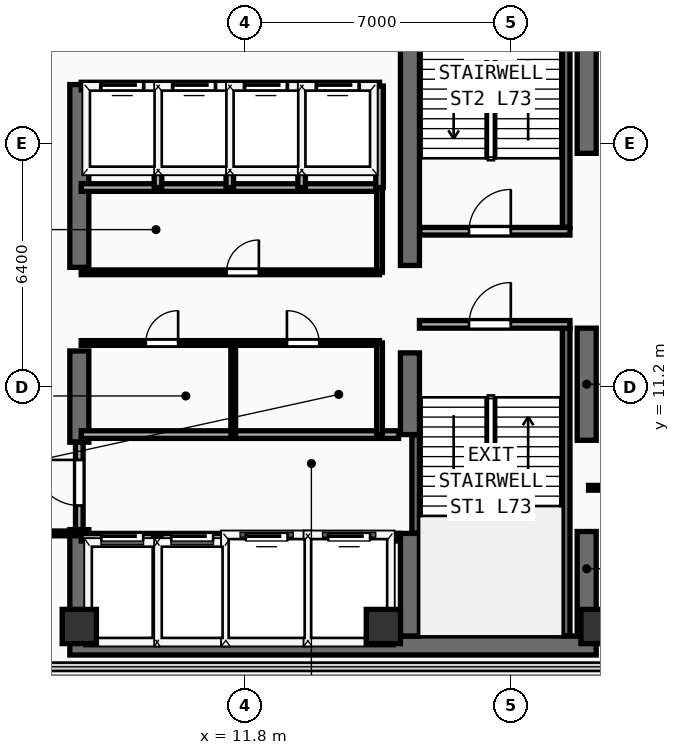
"""IFC4 building model, lengths in metres.
Left out: names, types, materials, properties, quantities, classifications, styles, units other than length and angle.
Written with IfcOpenShell. Run it as: python <this file> out.ifc"""

import sys

from ifc_helpers import new_model, si_unit, direction, frame, frame_2d, origin, origin_2d, place, context, subcontext, project, spatial, rectangle, extrude, element, fill, save


model = new_model("IFC4")
c1 = context("Model", 3, precision=1e-05, world=origin(), true_north=direction((0.0, 1.0)))
c2 = subcontext(c1, "Body", "Model", "MODEL_VIEW")
j1 = project(units=[si_unit("LENGTHUNIT", "METRE"), si_unit("PLANEANGLEUNIT", "RADIAN")], contexts=[c1])
p1 = place(None, origin())
s1 = spatial("IfcSite", under=j1, at=p1, CompositionType="ELEMENT")
p2 = place(p1, origin())
s2 = spatial("IfcBuilding", under=s1, at=p2, CompositionType="ELEMENT")
p3 = place(p2, frame((0.0, 0.0, 285.6)))
s3 = spatial("IfcBuildingStorey", under=s2, at=p3, CompositionType="ELEMENT", Elevation=285.6)
p4 = place(p3, frame((7.2, 4.4, 0.0), z_axis=(0.0, 0.0, 1.0), x_axis=(1.0, 0.0, 0.0)))
e1 = element("IfcWall", 1, at=p4, inside=s3, PredefinedType="SHEAR", context=c2, shape_type="SweptSolid", body=[
    extrude(rectangle(XDim=13.85, YDim=0.5, at=frame_2d((6.925, 0.0))), origin(), (0.0, 0.0, 1.0), 3.56),
])
p5 = place(p3, frame((7.45, 4.65, 0.0), z_axis=(0.0, 0.0, 1.0), x_axis=(0.0, 1.0, 0.0)))
e2 = element("IfcWall", 2, at=p5, inside=s3, PredefinedType="SHEAR", context=c2, shape_type="SweptSolid", body=[
    extrude(rectangle(XDim=2.8, YDim=0.5, at=frame_2d((1.4, 0.0))), origin(), (0.0, 0.0, 1.0), 3.56),
])
p6 = place(p3, frame((7.45, 9.75, 0.0), z_axis=(0.0, 0.0, 1.0), x_axis=(0.0, 1.0, 0.0)))
e3 = element("IfcWall", 3, at=p6, inside=s3, PredefinedType="SHEAR", context=c2, shape_type="SweptSolid", body=[
    extrude(rectangle(XDim=2.4, YDim=0.5, at=frame_2d((1.2, 0.0))), origin(), (0.0, 0.0, 1.0), 3.56),
])
p7 = place(p3, frame((7.45, 14.35, 0.0), z_axis=(0.0, 0.0, 1.0), x_axis=(0.0, 1.0, 0.0)))
e4 = element("IfcWall", 4, at=p7, inside=s3, PredefinedType="SHEAR", context=c2, shape_type="SweptSolid", body=[
    extrude(rectangle(XDim=4.81, YDim=0.5, at=frame_2d((2.405, 0.0))), origin(), (0.0, 0.0, 1.0), 3.56),
])
p8 = place(p3, frame((20.8, 4.65, 0.0), z_axis=(0.0, 0.0, 1.0), x_axis=(0.0, 1.0, 0.0)))
e5 = element("IfcWall", 5, at=p8, inside=s3, PredefinedType="SHEAR", context=c2, shape_type="SweptSolid", body=[
    extrude(rectangle(XDim=2.75, YDim=0.5, at=frame_2d((1.375, 0.0))), origin(), (0.0, 0.0, 1.0), 3.56),
])
p9 = place(p3, frame((20.8, 9.8, 0.0), z_axis=(0.0, 0.0, 1.0), x_axis=(0.0, 1.0, 0.0)))
e6 = element("IfcWall", 6, at=p9, inside=s3, PredefinedType="SHEAR", context=c2, shape_type="SweptSolid", body=[
    extrude(rectangle(XDim=2.95, YDim=0.5, at=frame_2d((1.475, 0.0))), origin(), (0.0, 0.0, 1.0), 3.56),
])
p10 = place(p3, frame((20.8, 17.35, 0.0), z_axis=(0.0, 0.0, 1.0), x_axis=(0.0, 1.0, 0.0)))
e7 = element("IfcWall", 7, at=p10, inside=s3, PredefinedType="SHEAR", context=c2, shape_type="SweptSolid", body=[
    extrude(rectangle(XDim=6.15, YDim=0.5, at=frame_2d((3.075, 0.0))), origin(), (0.0, 0.0, 1.0), 3.56),
])
p11 = place(p3, frame((16.15, 4.65, 0.0), z_axis=(0.0, 0.0, 1.0), x_axis=(0.0, 1.0, 0.0)))
e8 = element("IfcWall", 8, at=p11, inside=s3, PredefinedType="SHEAR", context=c2, shape_type="SweptSolid", body=[
    extrude(rectangle(XDim=2.7, YDim=0.5, at=frame_2d((1.35, 0.0))), origin(), (0.0, 0.0, 1.0), 3.56),
])
p12 = place(p3, frame((16.15, 9.95, 0.0), z_axis=(0.0, 0.0, 1.0), x_axis=(0.0, 1.0, 0.0)))
e9 = element("IfcWall", 9, at=p12, inside=s3, PredefinedType="SHEAR", context=c2, shape_type="SweptSolid", body=[
    extrude(rectangle(XDim=2.15, YDim=0.5, at=frame_2d((1.075, 0.0))), origin(), (0.0, 0.0, 1.0), 3.56),
])
p13 = place(p3, frame((16.15, 14.4, 0.0), z_axis=(0.0, 0.0, 1.0), x_axis=(0.0, 1.0, 0.0)))
e10 = element("IfcWall", 10, at=p13, inside=s3, PredefinedType="SHEAR", context=c2, shape_type="SweptSolid", body=[
    extrude(rectangle(XDim=9.1, YDim=0.5, at=frame_2d((4.55, 0.0))), origin(), (0.0, 0.0, 1.0), 3.56),
])
for number, where, z_axis, x_axis in (
    (11, (7.45, 4.9, 0.0), (0.0, 0.0, 1.0), (1.0, 0.0, 0.0)),
    (12, (15.45, 4.9, 0.0), (0.0, 0.0, 1.0), (1.0, 0.0, 0.0)),
    (13, (21.1, 4.9, 0.0), (0.0, 0.0, 1.0), (1.0, 0.0, 0.0)),
):
    element("IfcColumn", number, at=place(p3, frame(where, z_axis=z_axis, x_axis=x_axis)), inside=s3, PredefinedType="COLUMN", context=c2, shape_type="SweptSolid", body=[
        extrude(rectangle(XDim=0.9, YDim=0.9, at=origin_2d()), origin(), (0.0, 0.0, 1.0), 3.56),
    ])
p14 = place(p3, frame((27.622, 19.712, 0.0), z_axis=(0.0, 0.0, 1.0), x_axis=(-0.707120040392, 0.707093521733, 0.0)))
e14 = element("IfcWall", 14, at=p14, inside=s3, PredefinedType="SOLIDWALL", context=c2, shape_type="SweptSolid", body=[
    extrude(rectangle(XDim=9.206, YDim=0.28, at=frame_2d((4.603, 0.0))), origin(), (0.0, 0.0, 1.0), 3.56),
])
p15 = place(p3, frame((16.3, 7.36, 0.0), z_axis=(0.0, 0.0, 1.0), x_axis=(0.0, 1.0, 0.0)))
e15 = element("IfcWall", 15, at=p15, inside=s3, PredefinedType="SHEAR", context=c2, shape_type="SweptSolid", body=[
    extrude(rectangle(XDim=2.58, YDim=0.2, at=frame_2d((1.29, 0.0))), origin(), (0.0, 0.0, 1.0), 3.56),
])
p16 = place(p3, frame((20.26, 4.66, 0.0), z_axis=(0.0, 0.0, 1.0), x_axis=(0.0, 1.0, 0.0)))
e16 = element("IfcWall", 16, at=p16, inside=s3, PredefinedType="SHEAR", context=c2, shape_type="SweptSolid", body=[
    extrude(rectangle(XDim=8.09, YDim=0.2, at=frame_2d((4.045, 0.0))), origin(), (0.0, 0.0, 1.0), 3.56),
])
p17 = place(p3, frame((16.4, 12.85, 0.0), z_axis=(0.0, 0.0, 1.0), x_axis=(1.0, 0.0, 0.0)))
e17 = element("IfcWall", 17, at=p17, inside=s3, PredefinedType="PARTITIONING", context=c2, shape_type="SweptSolid", body=[
    extrude(rectangle(XDim=3.96, YDim=0.2, at=frame_2d((1.98, 0.0))), origin(), (0.0, 0.0, 1.0), 3.56),
])
p18 = place(p17, frame((1.304, 0.0, 0.0)))
e18 = element("IfcOpeningElement", 18, at=p18, cuts=e17, PredefinedType="OPENING", context=c2, shape_type="SweptSolid", body=[
    extrude(rectangle(XDim=1.1, YDim=2.2, at=frame_2d((0.55, 1.1))), frame((0.0, 0.11, 0.0), z_axis=(0.0, -1.0, 0.0), x_axis=(1.0, 0.0, 0.0)), (0.0, 0.0, 1.0), 0.22),
])
p19 = place(p3, frame((20.26, 15.4, 0.0), z_axis=(0.0, 0.0, 1.0), x_axis=(0.0, 1.0, 0.0)))
e19 = element("IfcWall", 19, at=p19, inside=s3, PredefinedType="SHEAR", context=c2, shape_type="SweptSolid", body=[
    extrude(rectangle(XDim=8.09, YDim=0.2, at=frame_2d((4.045, 0.0))), origin(), (0.0, 0.0, 1.0), 3.56),
])
p20 = place(p3, frame((16.41, 15.3, 0.0), z_axis=(0.0, 0.0, 1.0), x_axis=(1.0, 0.0, 0.0)))
e20 = element("IfcWall", 20, at=p20, inside=s3, PredefinedType="PARTITIONING", context=c2, shape_type="SweptSolid", body=[
    extrude(rectangle(XDim=3.95, YDim=0.2, at=frame_2d((1.975, 0.0))), origin(), (0.0, 0.0, 1.0), 3.56),
])
p21 = place(p20, frame((1.294, 0.0, 0.0)))
e21 = element("IfcOpeningElement", 21, at=p21, cuts=e20, PredefinedType="OPENING", context=c2, shape_type="SweptSolid", body=[
    extrude(rectangle(XDim=1.1, YDim=2.2, at=frame_2d((0.55, 1.1))), frame((0.0, 0.11, 0.0), z_axis=(0.0, -1.0, 0.0), x_axis=(1.0, 0.0, 0.0)), (0.0, 0.0, 1.0), 0.22),
])
p22 = place(p3, frame((7.5, 7.25, 0.0), z_axis=(0.0, 0.0, 1.0), x_axis=(1.0, 0.0, 0.0)))
e22 = element("IfcWall", 22, at=p22, inside=s3, PredefinedType="PARTITIONING", context=c2, shape_type="SweptSolid", body=[
    extrude(rectangle(XDim=8.35, YDim=0.2, at=frame_2d((4.175, 0.0))), origin(), (0.0, 0.0, 1.0), 3.56),
])
p23 = place(p22, frame((0.53, 0.0, 0.0)))
e23 = element("IfcOpeningElement", 23, at=p23, cuts=e22, PredefinedType="OPENING", context=c2, shape_type="SweptSolid", body=[
    extrude(rectangle(XDim=1.1, YDim=2.2, at=frame_2d((0.55, 1.1))), frame((0.0, 0.11, 0.0), z_axis=(0.0, -1.0, 0.0), x_axis=(1.0, 0.0, 0.0)), (0.0, 0.0, 1.0), 0.22),
])
p24 = place(p22, frame((2.37, 0.0, 0.0)))
e24 = element("IfcOpeningElement", 24, at=p24, cuts=e22, PredefinedType="OPENING", context=c2, shape_type="SweptSolid", body=[
    extrude(rectangle(XDim=1.1, YDim=2.2, at=frame_2d((0.55, 1.1))), frame((0.0, 0.11, 0.0), z_axis=(0.0, -1.0, 0.0), x_axis=(1.0, 0.0, 0.0)), (0.0, 0.0, 1.0), 0.22),
])
p25 = place(p22, frame((4.33, 0.0, 0.0)))
e25 = element("IfcOpeningElement", 25, at=p25, cuts=e22, PredefinedType="OPENING", context=c2, shape_type="SweptSolid", body=[
    extrude(rectangle(XDim=1.1, YDim=2.2, at=frame_2d((0.55, 1.1))), frame((0.0, 0.11, 0.0), z_axis=(0.0, -1.0, 0.0), x_axis=(1.0, 0.0, 0.0)), (0.0, 0.0, 1.0), 0.22),
])
p26 = place(p22, frame((6.5, 0.0, 0.0)))
e26 = element("IfcOpeningElement", 26, at=p26, cuts=e22, PredefinedType="OPENING", context=c2, shape_type="SweptSolid", body=[
    extrude(rectangle(XDim=1.1, YDim=2.2, at=frame_2d((0.55, 1.1))), frame((0.0, 0.11, 0.0), z_axis=(0.0, -1.0, 0.0), x_axis=(1.0, 0.0, 0.0)), (0.0, 0.0, 1.0), 0.22),
])
p27 = place(p3, frame((7.5, 9.95, 0.0), z_axis=(0.0, 0.0, 1.0), x_axis=(1.0, 0.0, 0.0)))
e27 = element("IfcWall", 27, at=p27, inside=s3, PredefinedType="PARTITIONING", context=c2, shape_type="SweptSolid", body=[
    extrude(rectangle(XDim=8.35, YDim=0.2, at=frame_2d((4.175, 0.0))), origin(), (0.0, 0.0, 1.0), 3.56),
])
for number, where, z_axis, x_axis in (
    (28, (9.5, 4.45, 0.0), (0.0, 0.0, 1.0), (0.0, 1.0, 0.0)),
    (29, (11.36, 4.45, 0.0), (0.0, 0.0, 1.0), (0.0, 1.0, 0.0)),
    (30, (13.46, 4.45, 0.0), (0.0, 0.0, 1.0), (0.0, 1.0, 0.0)),
):
    element("IfcWall", number, at=place(p3, frame(where, z_axis=z_axis, x_axis=x_axis)), inside=s3, PredefinedType="PARTITIONING", context=c2, shape_type="SweptSolid", body=[
        extrude(rectangle(XDim=2.8, YDim=0.2, at=frame_2d((1.4, 0.0))), origin(), (0.0, 0.0, 1.0), 3.56),
    ])
p28 = place(p3, frame((7.45, 7.45, 0.0), z_axis=(0.0, 0.0, 1.0), x_axis=(0.0, 1.0, 0.0)))
e31 = element("IfcWall", 31, at=p28, inside=s3, PredefinedType="PARTITIONING", context=c2, shape_type="SweptSolid", body=[
    extrude(rectangle(XDim=2.3, YDim=0.2, at=frame_2d((1.15, 0.0))), origin(), (0.0, 0.0, 1.0), 2.54),
])
p29 = place(p28, frame((0.633, 0.0, 0.0)))
e32 = element("IfcOpeningElement", 32, at=p29, cuts=e31, PredefinedType="OPENING", context=c2, shape_type="SweptSolid", body=[
    extrude(rectangle(XDim=1.2, YDim=2.25, at=frame_2d((0.6, 1.125))), frame((0.0, 0.11, 0.0), z_axis=(0.0, -1.0, 0.0), x_axis=(1.0, 0.0, 0.0)), (0.0, 0.0, 1.0), 0.22),
])
p30 = place(p3, frame((7.5, 16.45, 0.0), z_axis=(0.0, 0.0, 1.0), x_axis=(1.0, 0.0, 0.0)))
e33 = element("IfcWall", 33, at=p30, inside=s3, PredefinedType="PARTITIONING", context=c2, shape_type="SweptSolid", body=[
    extrude(rectangle(XDim=7.85, YDim=0.2, at=frame_2d((3.925, 0.0))), origin(), (0.0, 0.0, 1.0), 3.56),
])
p31 = place(p3, frame((7.5, 12.36, 0.0), z_axis=(0.0, 0.0, 1.0), x_axis=(1.0, 0.0, 0.0)))
e34 = element("IfcWall", 34, at=p31, inside=s3, PredefinedType="PARTITIONING", context=c2, shape_type="SweptSolid", body=[
    extrude(rectangle(XDim=7.85, YDim=0.125, at=frame_2d((3.925, 0.0))), origin(), (0.0, 0.0, 1.0), 3.56),
])
p32 = place(p31, frame((1.7, 0.0, 0.0)))
e35 = element("IfcOpeningElement", 35, at=p32, cuts=e34, PredefinedType="OPENING", context=c2, shape_type="SweptSolid", body=[
    extrude(rectangle(XDim=0.85, YDim=2.15, at=frame_2d((0.425, 1.075))), frame((0.0, 0.073, 0.0), z_axis=(0.0, -1.0, 0.0), x_axis=(1.0, 0.0, 0.0)), (0.0, 0.0, 1.0), 0.145),
])
p33 = place(p31, frame((5.413, 0.0, 0.0)))
e36 = element("IfcOpeningElement", 36, at=p33, cuts=e34, PredefinedType="OPENING", context=c2, shape_type="SweptSolid", body=[
    extrude(rectangle(XDim=0.85, YDim=2.15, at=frame_2d((0.425, 1.075))), frame((0.0, 0.073, 0.0), z_axis=(0.0, -1.0, 0.0), x_axis=(1.0, 0.0, 0.0)), (0.0, 0.0, 1.0), 0.145),
])
p34 = place(p3, frame((7.5, 14.22, 0.0), z_axis=(0.0, 0.0, 1.0), x_axis=(1.0, 0.0, 0.0)))
e37 = element("IfcWall", 37, at=p34, inside=s3, PredefinedType="PARTITIONING", context=c2, shape_type="SweptSolid", body=[
    extrude(rectangle(XDim=7.85, YDim=0.125, at=frame_2d((3.925, 0.0))), origin(), (0.0, 0.0, 1.0), 3.56),
])
p35 = place(p34, frame((3.825, 0.0, 0.0)))
e38 = element("IfcOpeningElement", 38, at=p35, cuts=e37, PredefinedType="OPENING", context=c2, shape_type="SweptSolid", body=[
    extrude(rectangle(XDim=0.85, YDim=2.15, at=frame_2d((0.425, 1.075))), frame((0.0, 0.073, 0.0), z_axis=(0.0, -1.0, 0.0), x_axis=(1.0, 0.0, 0.0)), (0.0, 0.0, 1.0), 0.145),
])
p36 = place(p3, frame((15.35, 9.95, 0.0), z_axis=(0.0, 0.0, 1.0), x_axis=(0.0, 1.0, 0.0)))
e39 = element("IfcWall", 39, at=p36, inside=s3, PredefinedType="PARTITIONING", context=c2, shape_type="SweptSolid", body=[
    extrude(rectangle(XDim=2.41, YDim=0.15, at=frame_2d((1.205, 0.0))), origin(), (0.0, 0.0, 1.0), 3.56),
])
p37 = place(p3, frame((15.35, 14.22, 0.0), z_axis=(0.0, 0.0, 1.0), x_axis=(0.0, 1.0, 0.0)))
e40 = element("IfcWall", 40, at=p37, inside=s3, PredefinedType="PARTITIONING", context=c2, shape_type="SweptSolid", body=[
    extrude(rectangle(XDim=2.23, YDim=0.15, at=frame_2d((1.115, 0.0))), origin(), (0.0, 0.0, 1.0), 3.56),
])
p38 = place(p3, frame((11.5, 9.95, 0.0), z_axis=(0.0, 0.0, 1.0), x_axis=(0.0, 1.0, 0.0)))
e41 = element("IfcWall", 41, at=p38, inside=s3, PredefinedType="PARTITIONING", context=c2, shape_type="SweptSolid", body=[
    extrude(rectangle(XDim=2.41, YDim=0.125, at=frame_2d((1.205, 0.0))), origin(), (0.0, 0.0, 1.0), 3.56),
])
p39 = place(p3, frame((7.5, 19.12, 0.0), z_axis=(0.0, 0.0, 1.0), x_axis=(1.0, 0.0, 0.0)))
e42 = element("IfcWall", 42, at=p39, inside=s3, PredefinedType="PARTITIONING", context=c2, shape_type="SweptSolid", body=[
    extrude(rectangle(XDim=7.85, YDim=0.2, at=frame_2d((3.925, 0.0))), origin(), (0.0, 0.0, 1.0), 3.56),
])
p40 = place(p39, frame((0.53, 0.0, 0.0)))
e43 = element("IfcOpeningElement", 43, at=p40, cuts=e42, PredefinedType="OPENING", context=c2, shape_type="SweptSolid", body=[
    extrude(rectangle(XDim=1.1, YDim=2.2, at=frame_2d((0.55, 1.1))), frame((0.0, 0.11, 0.0), z_axis=(0.0, -1.0, 0.0), x_axis=(1.0, 0.0, 0.0)), (0.0, 0.0, 1.0), 0.22),
])
p41 = place(p39, frame((2.42, 0.0, 0.0)))
e44 = element("IfcOpeningElement", 44, at=p41, cuts=e42, PredefinedType="OPENING", context=c2, shape_type="SweptSolid", body=[
    extrude(rectangle(XDim=1.1, YDim=2.2, at=frame_2d((0.55, 1.1))), frame((0.0, 0.11, 0.0), z_axis=(0.0, -1.0, 0.0), x_axis=(1.0, 0.0, 0.0)), (0.0, 0.0, 1.0), 0.22),
])
p42 = place(p39, frame((4.31, 0.0, 0.0)))
e45 = element("IfcOpeningElement", 45, at=p42, cuts=e42, PredefinedType="OPENING", context=c2, shape_type="SweptSolid", body=[
    extrude(rectangle(XDim=1.1, YDim=2.2, at=frame_2d((0.55, 1.1))), frame((0.0, 0.11, 0.0), z_axis=(0.0, -1.0, 0.0), x_axis=(1.0, 0.0, 0.0)), (0.0, 0.0, 1.0), 0.22),
])
p43 = place(p39, frame((6.2, 0.0, 0.0)))
e46 = element("IfcOpeningElement", 46, at=p43, cuts=e42, PredefinedType="OPENING", context=c2, shape_type="SweptSolid", body=[
    extrude(rectangle(XDim=1.1, YDim=2.2, at=frame_2d((0.55, 1.1))), frame((0.0, 0.11, 0.0), z_axis=(0.0, -1.0, 0.0), x_axis=(1.0, 0.0, 0.0)), (0.0, 0.0, 1.0), 0.22),
])
for number, where, z_axis, x_axis in (
    (47, (15.35, 16.45, 0.0), (0.0, 0.0, 1.0), (0.0, 1.0, 0.0)),
    (48, (9.52, 16.45, 0.0), (0.0, 0.0, 1.0), (0.0, 1.0, 0.0)),
    (49, (11.41, 16.45, 0.0), (0.0, 0.0, 1.0), (0.0, 1.0, 0.0)),
    (50, (13.3, 16.45, 0.0), (0.0, 0.0, 1.0), (0.0, 1.0, 0.0)),
):
    element("IfcWall", number, at=place(p3, frame(where, z_axis=z_axis, x_axis=x_axis)), inside=s3, PredefinedType="PARTITIONING", context=c2, shape_type="SweptSolid", body=[
        extrude(rectangle(XDim=2.67, YDim=0.2, at=frame_2d((1.335, 0.0))), origin(), (0.0, 0.0, 1.0), 3.56),
    ])
p44 = place(p3, frame((4.04, 7.35, 0.0), z_axis=(0.0, 0.0, 1.0), x_axis=(1.0, 0.0, 0.0)))
e51 = element("IfcWall", 51, at=p44, inside=s3, PredefinedType="PARTITIONING", context=c2, shape_type="SweptSolid", body=[
    extrude(rectangle(XDim=3.36, YDim=0.125, at=frame_2d((1.68, 0.0))), origin(), (0.0, 0.0, 1.0), 3.56),
])
p45 = place(p44, frame((1.687, 0.0, 0.0)))
e52 = element("IfcOpeningElement", 52, at=p45, cuts=e51, PredefinedType="OPENING", context=c2, shape_type="SweptSolid", body=[
    extrude(rectangle(XDim=0.85, YDim=2.15, at=frame_2d((0.425, 1.075))), frame((0.0, 0.073, 0.0), z_axis=(0.0, -1.0, 0.0), x_axis=(1.0, 0.0, 0.0)), (0.0, 0.0, 1.0), 0.145),
])
p46 = place(p3, frame((20.85, 8.55, 0.0), z_axis=(0.0, 0.0, 1.0), x_axis=(1.0, 0.0, 0.0)))
e53 = element("IfcWall", 53, at=p46, inside=s3, PredefinedType="PARTITIONING", context=c2, shape_type="SweptSolid", body=[
    extrude(rectangle(XDim=2.85, YDim=0.125, at=frame_2d((1.425, 0.0))), origin(), (0.0, 0.0, 1.0), 3.56),
])
p47 = place(p46, frame((0.971, 0.0, 0.0)))
e54 = element("IfcOpeningElement", 54, at=p47, cuts=e53, PredefinedType="OPENING", context=c2, shape_type="SweptSolid", body=[
    extrude(rectangle(XDim=0.95, YDim=2.15, at=frame_2d((0.475, 1.075))), frame((0.0, 0.073, 0.0), z_axis=(0.0, -1.0, 0.0), x_axis=(1.0, 0.0, 0.0)), (0.0, 0.0, 1.0), 0.145),
])
p48 = place(p18, frame((1.1, 0.0, 0.0), z_axis=(0.0, 0.0, 1.0), x_axis=(-1.0, 0.0, 0.0)))
e55 = element("IfcDoor", 55, at=p48, inside=s3, OperationType="SINGLE_SWING_LEFT", PredefinedType="DOOR", context=c2, shape_type="SweptSolid", body=[
    extrude(rectangle(XDim=1.1, YDim=2.2, at=frame_2d((0.55, 1.1))), frame((0.0, 0.025, 0.0), z_axis=(0.0, -1.0, 0.0), x_axis=(1.0, 0.0, 0.0)), (0.0, 0.0, 1.0), 0.05),
])
fill(e18, e55)
p49 = place(p21, origin())
e56 = element("IfcDoor", 56, at=p49, inside=s3, OperationType="SINGLE_SWING_RIGHT", PredefinedType="DOOR", context=c2, shape_type="SweptSolid", body=[
    extrude(rectangle(XDim=1.1, YDim=2.2, at=frame_2d((0.55, 1.1))), frame((0.0, 0.025, 0.0), z_axis=(0.0, -1.0, 0.0), x_axis=(1.0, 0.0, 0.0)), (0.0, 0.0, 1.0), 0.05),
])
fill(e21, e56)
p50 = place(p23, origin())
e57 = element("IfcDoor", 57, at=p50, inside=s3, OperationType="SLIDING_TO_LEFT", PredefinedType="DOOR", context=c2, shape_type="SweptSolid", body=[
    extrude(rectangle(XDim=1.1, YDim=2.2, at=frame_2d((0.55, 1.1))), frame((0.0, 0.025, 0.0), z_axis=(0.0, -1.0, 0.0), x_axis=(1.0, 0.0, 0.0)), (0.0, 0.0, 1.0), 0.05),
])
fill(e23, e57)
p51 = place(p24, origin())
e58 = element("IfcDoor", 58, at=p51, inside=s3, OperationType="SLIDING_TO_LEFT", PredefinedType="DOOR", context=c2, shape_type="SweptSolid", body=[
    extrude(rectangle(XDim=1.1, YDim=2.2, at=frame_2d((0.55, 1.1))), frame((0.0, 0.025, 0.0), z_axis=(0.0, -1.0, 0.0), x_axis=(1.0, 0.0, 0.0)), (0.0, 0.0, 1.0), 0.05),
])
fill(e24, e58)
p52 = place(p25, origin())
e59 = element("IfcDoor", 59, at=p52, inside=s3, OperationType="SLIDING_TO_LEFT", PredefinedType="DOOR", context=c2, shape_type="SweptSolid", body=[
    extrude(rectangle(XDim=1.1, YDim=2.2, at=frame_2d((0.55, 1.1))), frame((0.0, 0.025, 0.0), z_axis=(0.0, -1.0, 0.0), x_axis=(1.0, 0.0, 0.0)), (0.0, 0.0, 1.0), 0.05),
])
fill(e25, e59)
p53 = place(p26, origin())
e60 = element("IfcDoor", 60, at=p53, inside=s3, OperationType="SLIDING_TO_LEFT", PredefinedType="DOOR", context=c2, shape_type="SweptSolid", body=[
    extrude(rectangle(XDim=1.1, YDim=2.2, at=frame_2d((0.55, 1.1))), frame((0.0, 0.025, 0.0), z_axis=(0.0, -1.0, 0.0), x_axis=(1.0, 0.0, 0.0)), (0.0, 0.0, 1.0), 0.05),
])
fill(e26, e60)
p54 = place(p29, frame((1.2, 0.0, 0.0), z_axis=(0.0, 0.0, 1.0), x_axis=(-1.0, 0.0, 0.0)))
e61 = element("IfcDoor", 61, at=p54, inside=s3, OperationType="SINGLE_SWING_LEFT", PredefinedType="DOOR", context=c2, shape_type="SweptSolid", body=[
    extrude(rectangle(XDim=1.2, YDim=2.25, at=frame_2d((0.6, 1.125))), frame((0.0, 0.025, 0.0), z_axis=(0.0, -1.0, 0.0), x_axis=(1.0, 0.0, 0.0)), (0.0, 0.0, 1.0), 0.05),
])
fill(e32, e61)
p55 = place(p32, origin())
e62 = element("IfcDoor", 62, at=p55, inside=s3, OperationType="SINGLE_SWING_RIGHT", PredefinedType="DOOR", context=c2, shape_type="SweptSolid", body=[
    extrude(rectangle(XDim=0.85, YDim=2.15, at=frame_2d((0.425, 1.075))), frame((0.0, 0.025, 0.0), z_axis=(0.0, -1.0, 0.0), x_axis=(1.0, 0.0, 0.0)), (0.0, 0.0, 1.0), 0.05),
])
fill(e35, e62)
p56 = place(p33, origin())
e63 = element("IfcDoor", 63, at=p56, inside=s3, OperationType="SINGLE_SWING_LEFT", PredefinedType="DOOR", context=c2, shape_type="SweptSolid", body=[
    extrude(rectangle(XDim=0.85, YDim=2.15, at=frame_2d((0.425, 1.075))), frame((0.0, 0.025, 0.0), z_axis=(0.0, -1.0, 0.0), x_axis=(1.0, 0.0, 0.0)), (0.0, 0.0, 1.0), 0.05),
])
fill(e36, e63)
p57 = place(p35, origin())
e64 = element("IfcDoor", 64, at=p57, inside=s3, OperationType="SINGLE_SWING_RIGHT", PredefinedType="DOOR", context=c2, shape_type="SweptSolid", body=[
    extrude(rectangle(XDim=0.85, YDim=2.15, at=frame_2d((0.425, 1.075))), frame((0.0, 0.025, 0.0), z_axis=(0.0, -1.0, 0.0), x_axis=(1.0, 0.0, 0.0)), (0.0, 0.0, 1.0), 0.05),
])
fill(e38, e64)
p58 = place(p40, origin())
e65 = element("IfcDoor", 65, at=p58, inside=s3, OperationType="SLIDING_TO_LEFT", PredefinedType="DOOR", context=c2, shape_type="SweptSolid", body=[
    extrude(rectangle(XDim=1.1, YDim=2.2, at=frame_2d((0.55, 1.1))), frame((0.0, 0.025, 0.0), z_axis=(0.0, -1.0, 0.0), x_axis=(1.0, 0.0, 0.0)), (0.0, 0.0, 1.0), 0.05),
])
fill(e43, e65)
p59 = place(p41, origin())
e66 = element("IfcDoor", 66, at=p59, inside=s3, OperationType="SLIDING_TO_LEFT", PredefinedType="DOOR", context=c2, shape_type="SweptSolid", body=[
    extrude(rectangle(XDim=1.1, YDim=2.2, at=frame_2d((0.55, 1.1))), frame((0.0, 0.025, 0.0), z_axis=(0.0, -1.0, 0.0), x_axis=(1.0, 0.0, 0.0)), (0.0, 0.0, 1.0), 0.05),
])
fill(e44, e66)
p60 = place(p42, origin())
e67 = element("IfcDoor", 67, at=p60, inside=s3, OperationType="SLIDING_TO_LEFT", PredefinedType="DOOR", context=c2, shape_type="SweptSolid", body=[
    extrude(rectangle(XDim=1.1, YDim=2.2, at=frame_2d((0.55, 1.1))), frame((0.0, 0.025, 0.0), z_axis=(0.0, -1.0, 0.0), x_axis=(1.0, 0.0, 0.0)), (0.0, 0.0, 1.0), 0.05),
])
fill(e45, e67)
p61 = place(p43, origin())
e68 = element("IfcDoor", 68, at=p61, inside=s3, OperationType="SLIDING_TO_LEFT", PredefinedType="DOOR", context=c2, shape_type="SweptSolid", body=[
    extrude(rectangle(XDim=1.1, YDim=2.2, at=frame_2d((0.55, 1.1))), frame((0.0, 0.025, 0.0), z_axis=(0.0, -1.0, 0.0), x_axis=(1.0, 0.0, 0.0)), (0.0, 0.0, 1.0), 0.05),
])
fill(e46, e68)
save(model, sys.argv[1])
